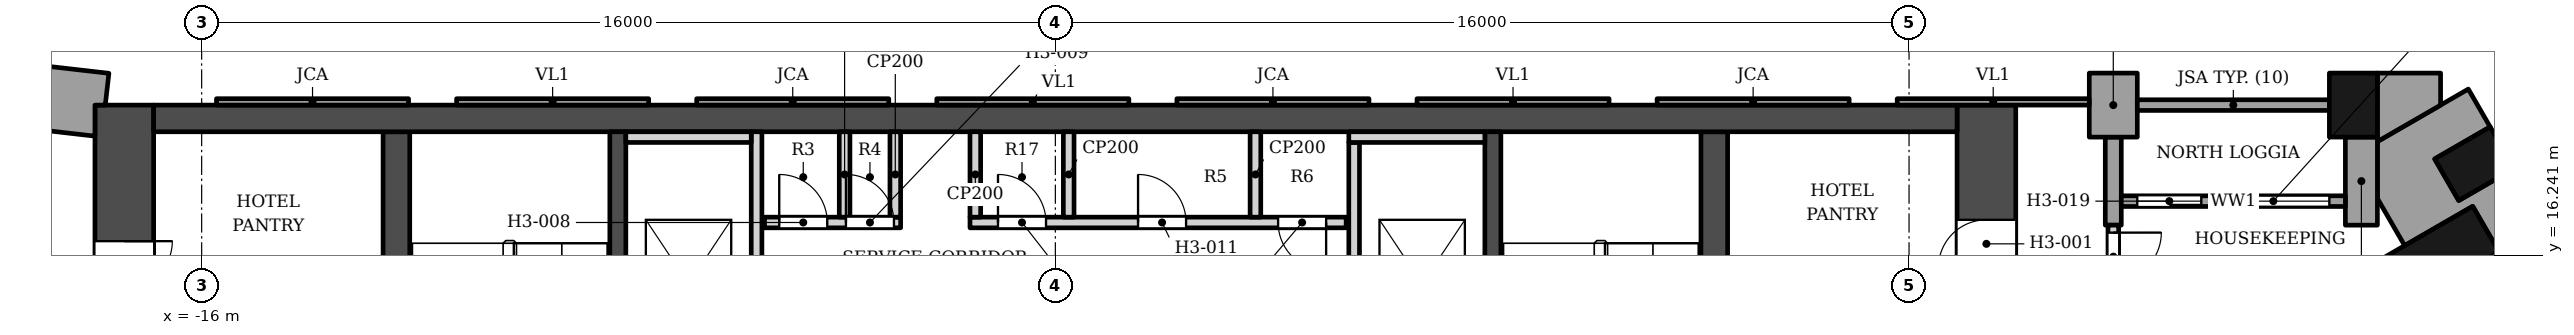
"""IFC4 building model, lengths in metres.
Left out: names, types, materials, properties, quantities, classifications, styles, units other than length and angle.
Written with IfcOpenShell. Run it as: python <this file> out.ifc"""

import sys

from ifc_helpers import new_model, si_unit, direction, frame, frame_2d, origin, origin_2d, place, context, subcontext, project, spatial, polyline, rectangle, outline, extrude, element, fill, save


model = new_model("IFC4")
c1 = context("Model", 3, precision=1e-05, world=origin(), true_north=direction((0.0, 1.0)))
c2 = subcontext(c1, "Body", "Model", "MODEL_VIEW")
j1 = project(units=[si_unit("LENGTHUNIT", "METRE"), si_unit("PLANEANGLEUNIT", "RADIAN")], contexts=[c1])
p1 = place(None, origin())
s1 = spatial("IfcSite", under=j1, at=p1, CompositionType="ELEMENT")
p2 = place(p1, origin())
s2 = spatial("IfcBuilding", under=s1, at=p2, CompositionType="ELEMENT")
p3 = place(p2, frame((0.0, 0.0, 66.4)))
s3 = spatial("IfcBuildingStorey", under=s2, at=p3, CompositionType="ELEMENT", Elevation=66.4)
p4 = place(p3, frame((-16.9, 18.802, 0.0), z_axis=(0.0, 0.0, 1.0), x_axis=(1.0, 0.0, 0.0)))
e1 = element("IfcWall", 1, at=p4, inside=s3, PredefinedType="SHEAR", context=c2, shape_type="SweptSolid", body=[
    extrude(rectangle(XDim=33.8, YDim=0.5, at=frame_2d((16.9, 0.0))), origin(), (0.0, 0.0, 1.0), 3.4),
])
p5 = place(p3, frame((-12.35, 5.253, 0.0), z_axis=(0.0, 0.0, 1.0), x_axis=(0.0, 1.0, 0.0)))
e2 = element("IfcWall", 2, at=p5, inside=s3, PredefinedType="SHEAR", context=c2, shape_type="SweptSolid", body=[
    extrude(rectangle(XDim=13.3, YDim=0.5, at=frame_2d((6.65, 0.0))), origin(), (0.0, 0.0, 1.0), 3.4),
])
p6 = place(p3, frame((-8.2, 5.253, 0.0), z_axis=(0.0, 0.0, 1.0), x_axis=(0.0, 1.0, 0.0)))
e3 = element("IfcWall", 3, at=p6, inside=s3, PredefinedType="SHEAR", context=c2, shape_type="SweptSolid", body=[
    extrude(rectangle(XDim=13.3, YDim=0.3, at=frame_2d((6.65, 0.0))), origin(), (0.0, 0.0, 1.0), 3.4),
])
p7 = place(p6, frame((7.1, 0.0, 0.0)))
e4 = element("IfcOpeningElement", 4, at=p7, cuts=e3, PredefinedType="OPENING", context=c2, shape_type="SweptSolid", body=[
    extrude(rectangle(XDim=1.4, YDim=2.1, at=frame_2d((0.7, 1.05))), frame((0.0, 0.16, 0.0), z_axis=(0.0, -1.0, 0.0), x_axis=(1.0, 0.0, 0.0)), (0.0, 0.0, 1.0), 0.32),
])
p8 = place(p6, frame((5.05, 0.0, 0.0)))
e5 = element("IfcOpeningElement", 5, at=p8, cuts=e3, PredefinedType="OPENING", context=c2, shape_type="SweptSolid", body=[
    extrude(rectangle(XDim=1.4, YDim=2.1, at=frame_2d((0.7, 1.05))), frame((0.0, 0.16, 0.0), z_axis=(0.0, -1.0, 0.0), x_axis=(1.0, 0.0, 0.0)), (0.0, 0.0, 1.0), 0.32),
])
p9 = place(p3, frame((12.35, 5.253, 0.0), z_axis=(0.0, 0.0, 1.0), x_axis=(0.0, 1.0, 0.0)))
e6 = element("IfcWall", 6, at=p9, inside=s3, PredefinedType="SHEAR", context=c2, shape_type="SweptSolid", body=[
    extrude(rectangle(XDim=13.3, YDim=0.5, at=frame_2d((6.65, 0.0))), origin(), (0.0, 0.0, 1.0), 3.4),
])
p10 = place(p3, frame((8.2, 5.253, 0.0), z_axis=(0.0, 0.0, 1.0), x_axis=(0.0, 1.0, 0.0)))
e7 = element("IfcWall", 7, at=p10, inside=s3, PredefinedType="SHEAR", context=c2, shape_type="SweptSolid", body=[
    extrude(rectangle(XDim=13.3, YDim=0.3, at=frame_2d((6.65, 0.0))), origin(), (0.0, 0.0, 1.0), 3.4),
])
p11 = place(p10, frame((7.1, 0.0, 0.0)))
e8 = element("IfcOpeningElement", 8, at=p11, cuts=e7, PredefinedType="OPENING", context=c2, shape_type="SweptSolid", body=[
    extrude(rectangle(XDim=1.4, YDim=2.1, at=frame_2d((0.7, 1.05))), frame((0.0, 0.16, 0.0), z_axis=(0.0, -1.0, 0.0), x_axis=(1.0, 0.0, 0.0)), (0.0, 0.0, 1.0), 0.32),
])
p12 = place(p10, frame((5.05, 0.0, 0.0)))
e9 = element("IfcOpeningElement", 9, at=p12, cuts=e7, PredefinedType="OPENING", context=c2, shape_type="SweptSolid", body=[
    extrude(rectangle(XDim=1.4, YDim=2.1, at=frame_2d((0.7, 1.05))), frame((0.0, 0.16, 0.0), z_axis=(0.0, -1.0, 0.0), x_axis=(1.0, 0.0, 0.0)), (0.0, 0.0, 1.0), 0.32),
])
p13 = place(p3, frame((-17.45, 5.853, 0.0), z_axis=(0.0, 0.0, 1.0), x_axis=(0.0, 1.0, 0.0)))
e10 = element("IfcWall", 10, at=p13, inside=s3, PredefinedType="SHEAR", context=c2, shape_type="SweptSolid", body=[
    extrude(rectangle(XDim=13.2, YDim=1.1, at=frame_2d((6.6, 0.0))), origin(), (0.0, 0.0, 1.0), 3.4),
])
p14 = place(p13, frame((4.1, 0.0, 0.0)))
e11 = element("IfcOpeningElement", 11, at=p14, cuts=e10, PredefinedType="OPENING", context=c2, shape_type="SweptSolid", body=[
    extrude(rectangle(XDim=1.6, YDim=2.1, at=frame_2d((0.8, 1.05))), frame((0.0, 0.56, 0.0), z_axis=(0.0, -1.0, 0.0), x_axis=(1.0, 0.0, 0.0)), (0.0, 0.0, 1.0), 1.12),
])
p15 = place(p13, frame((9.75, 0.0, 0.0)))
e12 = element("IfcOpeningElement", 12, at=p15, cuts=e10, PredefinedType="OPENING", context=c2, shape_type="SweptSolid", body=[
    extrude(rectangle(XDim=0.9, YDim=2.1, at=frame_2d((0.45, 1.05))), frame((0.0, 0.56, 0.0), z_axis=(0.0, -1.0, 0.0), x_axis=(1.0, 0.0, 0.0)), (0.0, 0.0, 1.0), 1.12),
])
p16 = place(p3, frame((17.45, 5.853, 0.0), z_axis=(0.0, 0.0, 1.0), x_axis=(0.0, 1.0, 0.0)))
e13 = element("IfcWall", 13, at=p16, inside=s3, PredefinedType="SHEAR", context=c2, shape_type="SweptSolid", body=[
    extrude(rectangle(XDim=13.2, YDim=1.1, at=frame_2d((6.6, 0.0))), origin(), (0.0, 0.0, 1.0), 3.4),
])
p17 = place(p16, frame((4.1, 0.0, 0.0)))
e14 = element("IfcOpeningElement", 14, at=p17, cuts=e13, PredefinedType="OPENING", context=c2, shape_type="SweptSolid", body=[
    extrude(rectangle(XDim=1.6, YDim=2.1, at=frame_2d((0.8, 1.05))), frame((0.0, 0.56, 0.0), z_axis=(0.0, -1.0, 0.0), x_axis=(1.0, 0.0, 0.0)), (0.0, 0.0, 1.0), 1.12),
])
p18 = place(p16, frame((10.15, 0.0, 0.0)))
e15 = element("IfcOpeningElement", 15, at=p18, cuts=e13, PredefinedType="OPENING", context=c2, shape_type="SweptSolid", body=[
    extrude(rectangle(XDim=0.9, YDim=2.1, at=frame_2d((0.45, 1.05))), frame((0.0, 0.56, 0.0), z_axis=(0.0, -1.0, 0.0), x_axis=(1.0, 0.0, 0.0)), (0.0, 0.0, 1.0), 1.12),
])
p19 = place(p3, frame((25.988, 15.004, 0.0), z_axis=(0.0, 0.0, 1.0), x_axis=(-0.866025412511, -0.499999984885, 0.0)))
e16 = element("IfcColumn", 16, at=p19, inside=s3, PredefinedType="COLUMN", context=c2, shape_type="SweptSolid", body=[
    extrude(rectangle(XDim=3.15, YDim=3.15, at=origin_2d()), origin(), (0.0, 0.0, 1.0), 3.4),
])
for number, where, z_axis, x_axis in (
    (17, (26.597, 17.954, 0.0), (0.0, 0.0, 1.0), (-0.5, 0.866, 0.0)),
    (18, (24.328, 19.053, 0.0), (0.0, 0.0, 1.0), (-1.0, 0.0, 0.0)),
):
    element("IfcColumn", number, at=place(p3, frame(where, z_axis=z_axis, x_axis=x_axis)), inside=s3, PredefinedType="COLUMN", context=c2, shape_type="SweptSolid", body=[
        extrude(rectangle(XDim=0.9, YDim=1.2, at=origin_2d()), origin(), (0.0, 0.0, 1.0), 3.4),
    ])
p20 = place(p3, origin())
e19 = element("IfcWall", 19, at=p20, inside=s3, PredefinedType="SOLIDWALL", context=c2, shape_type="SweptSolid", body=[
    extrude(outline(polyline([(24.778, 16.802), (24.778, 18.453), (24.178, 18.453), (24.178, 16.802), (24.778, 16.802)])), origin(), (0.0, 0.0, 1.0), 2.65),
])
p21 = place(p3, origin())
e20 = element("IfcWall", 20, at=p21, inside=s3, PredefinedType="SOLIDWALL", context=c2, shape_type="SweptSolid", body=[
    extrude(outline(polyline([(20.278, 19.653), (19.378, 19.653), (19.378, 18.453), (20.278, 18.453), (20.278, 19.653)])), origin(), (0.0, 0.0, 1.0), 2.65),
])
p22 = place(p3, origin())
e21 = element("IfcWall", 21, at=p22, inside=s3, PredefinedType="SOLIDWALL", context=c2, shape_type="SweptSolid", body=[
    extrude(outline(polyline([(19.678, 18.453), (19.678, 16.802), (19.978, 16.802), (19.978, 18.453), (19.678, 18.453)])), origin(), (0.0, 0.0, 1.0), 2.65),
])
p23 = place(p3, frame((23.878, 19.052, 0.0), z_axis=(0.0, 0.0, 1.0), x_axis=(-1.0, 0.0, 0.0)))
e22 = element("IfcWall", 22, at=p23, inside=s3, PredefinedType="SOLIDWALL", context=c2, shape_type="SweptSolid", body=[
    extrude(rectangle(XDim=3.6, YDim=0.2, at=frame_2d((1.8, 0.0))), origin(), (0.0, 0.0, 1.0), 2.65),
])
p24 = place(p3, frame((24.178, 17.252, 0.0), z_axis=(0.0, 0.0, 1.0), x_axis=(-1.0, 0.0, 0.0)))
e23 = element("IfcWall", 23, at=p24, inside=s3, PredefinedType="ELEMENTEDWALL", context=c2, shape_type="SweptSolid", body=[
    extrude(rectangle(XDim=4.2, YDim=0.2, at=frame_2d((2.1, 0.0))), origin(), (0.0, 0.0, 1.0), 2.65),
])
p25 = place(p24, frame((0.3, 0.0, 0.6)))
e24 = element("IfcOpeningElement", 24, at=p25, cuts=e23, PredefinedType="OPENING", context=c2, shape_type="SweptSolid", body=[
    extrude(rectangle(XDim=2.1, YDim=1.8, at=frame_2d((1.05, 0.9))), frame((0.0, 0.11, 0.0), z_axis=(0.0, -1.0, 0.0), x_axis=(1.0, 0.0, 0.0)), (0.0, 0.0, 1.0), 0.22),
])
p26 = place(p24, frame((2.7, 0.0, 0.0)))
e25 = element("IfcOpeningElement", 25, at=p26, cuts=e23, PredefinedType="OPENING", context=c2, shape_type="SweptSolid", body=[
    extrude(rectangle(XDim=1.2, YDim=2.4, at=frame_2d((0.6, 1.2))), frame((0.0, 0.11, 0.0), z_axis=(0.0, -1.0, 0.0), x_axis=(1.0, 0.0, 0.0)), (0.0, 0.0, 1.0), 0.22),
])
p27 = place(p3, origin())
e26 = element("IfcWall", 26, at=p27, inside=s3, PredefinedType="ELEMENTEDWALL", context=c2, shape_type="SweptSolid", body=[
    extrude(outline(polyline([(15.778, 19.173), (15.778, 19.052), (19.377, 19.052), (19.377, 19.173), (15.778, 19.173)])), origin(), (0.0, 0.0, 1.0), 2.65),
])
p28 = place(p3, origin())
e27 = element("IfcWall", 27, at=p28, inside=s3, PredefinedType="SOLIDWALL", context=c2, shape_type="SweptSolid", body=[
    extrude(outline(polyline([(11.278, 19.173), (11.278, 19.052), (14.878, 19.052), (14.878, 19.173), (11.278, 19.173)])), origin(), (0.0, 0.0, 1.0), 2.65),
])
p29 = place(p3, origin())
e28 = element("IfcWall", 28, at=p29, inside=s3, PredefinedType="ELEMENTEDWALL", context=c2, shape_type="SweptSolid", body=[
    extrude(outline(polyline([(6.778, 19.173), (6.778, 19.052), (10.378, 19.052), (10.378, 19.173), (6.778, 19.173)])), origin(), (0.0, 0.0, 1.0), 2.65),
])
p30 = place(p3, origin())
e29 = element("IfcWall", 29, at=p30, inside=s3, PredefinedType="SOLIDWALL", context=c2, shape_type="SweptSolid", body=[
    extrude(outline(polyline([(2.278, 19.173), (2.278, 19.052), (5.878, 19.052), (5.878, 19.173), (2.278, 19.173)])), origin(), (0.0, 0.0, 1.0), 2.65),
])
p31 = place(p3, origin())
e30 = element("IfcWall", 30, at=p31, inside=s3, PredefinedType="ELEMENTEDWALL", context=c2, shape_type="SweptSolid", body=[
    extrude(outline(polyline([(-2.222, 19.173), (-2.222, 19.052), (1.378, 19.052), (1.378, 19.173), (-2.222, 19.173)])), origin(), (0.0, 0.0, 1.0), 2.65),
])
p32 = place(p3, origin())
e31 = element("IfcWall", 31, at=p32, inside=s3, PredefinedType="SOLIDWALL", context=c2, shape_type="SweptSolid", body=[
    extrude(outline(polyline([(-6.722, 19.173), (-6.722, 19.052), (-3.122, 19.052), (-3.122, 19.173), (-6.722, 19.173)])), origin(), (0.0, 0.0, 1.0), 2.65),
])
p33 = place(p3, origin())
e32 = element("IfcWall", 32, at=p33, inside=s3, PredefinedType="ELEMENTEDWALL", context=c2, shape_type="SweptSolid", body=[
    extrude(outline(polyline([(-11.222, 19.173), (-11.222, 19.052), (-7.622, 19.052), (-7.622, 19.173), (-11.222, 19.173)])), origin(), (0.0, 0.0, 1.0), 2.65),
])
p34 = place(p3, origin())
e33 = element("IfcWall", 33, at=p34, inside=s3, PredefinedType="SOLIDWALL", context=c2, shape_type="SweptSolid", body=[
    extrude(outline(polyline([(-15.722, 19.173), (-15.722, 19.052), (-12.122, 19.052), (-12.122, 19.173), (-15.722, 19.173)])), origin(), (0.0, 0.0, 1.0), 2.65),
])
p35 = place(p3, origin())
e34 = element("IfcWall", 34, at=p35, inside=s3, PredefinedType="SOLIDWALL", context=c2, shape_type="SweptSolid", body=[
    extrude(outline(polyline([(25.852, 18.044), (26.891, 18.644), (26.482, 19.353), (24.778, 18.369), (24.778, 17.304), (25.289, 16.419), (26.564, 17.156), (28.139, 14.427), (26.864, 13.691), (27.287, 12.958), (27.836, 13.908), (28.443, 13.558), (28.102, 14.147), (29.141, 14.747), (27.341, 17.864), (26.302, 17.264), (25.852, 18.044)])), origin(), (0.0, 0.0, 1.0), 2.63),
])
p36 = place(p3, origin())
e35 = element("IfcWall", 35, at=p36, inside=s3, PredefinedType="SOLIDWALL", context=c2, shape_type="SweptSolid", body=[
    extrude(outline(polyline([(24.778, 18.453), (24.778, 18.369), (25.962, 19.052), (25.962, 19.653), (24.778, 19.653), (24.778, 18.453), (24.778, 18.453)])), origin(), (0.0, 0.0, 1.0), 2.63),
])
p37 = place(p3, origin())
e36 = element("IfcWall", 36, at=p37, inside=s3, PredefinedType="SOLIDWALL", context=c2, shape_type="SweptSolid", body=[
    extrude(outline(polyline([(-20.658, 19.983), (-20.795, 18.791), (-18.0, 18.471), (-18.0, 19.052), (-17.807, 19.052), (-17.739, 19.649), (-20.658, 19.983)])), origin(), (0.0, 0.0, 1.0), 2.65),
])
p38 = place(p3, frame((-5.6, 14.253, 0.0), z_axis=(0.0, 0.0, 1.0), x_axis=(0.0, 1.0, 0.0)))
e37 = element("IfcWall", 37, at=p38, inside=s3, PredefinedType="SOLIDWALL", context=c2, shape_type="SweptSolid", body=[
    extrude(rectangle(XDim=4.3, YDim=0.2, at=frame_2d((2.15, 0.0))), origin(), (0.0, 0.0, 1.0), 3.23),
])
p39 = place(p3, frame((5.6, 15.453, 0.0), z_axis=(0.0, 0.0, 1.0), x_axis=(0.0, 1.0, 0.0)))
e38 = element("IfcWall", 38, at=p39, inside=s3, PredefinedType="SOLIDWALL", context=c2, shape_type="SweptSolid", body=[
    extrude(rectangle(XDim=2.9, YDim=0.2, at=frame_2d((1.45, 0.0))), origin(), (0.0, 0.0, 1.0), 3.23),
])
p40 = place(p3, frame((-5.45, 16.853, 0.0), z_axis=(0.0, 0.0, 1.0), x_axis=(1.0, 0.0, 0.0)))
e39 = element("IfcWall", 39, at=p40, inside=s3, PredefinedType="SOLIDWALL", context=c2, shape_type="SweptSolid", body=[
    extrude(rectangle(XDim=2.55, YDim=0.2, at=frame_2d((1.275, 0.0))), origin(), (0.0, 0.0, 1.0), 3.23),
])
p41 = place(p40, frame((0.275, 0.0, 0.0)))
e40 = element("IfcOpeningElement", 40, at=p41, cuts=e39, PredefinedType="OPENING", context=c2, shape_type="SweptSolid", body=[
    extrude(rectangle(XDim=0.9, YDim=2.1, at=frame_2d((0.45, 1.05))), frame((0.0, 0.11, 0.0), z_axis=(0.0, -1.0, 0.0), x_axis=(1.0, 0.0, 0.0)), (0.0, 0.0, 1.0), 0.22),
])
p42 = place(p40, frame((1.525, 0.0, 0.0)))
e41 = element("IfcOpeningElement", 41, at=p42, cuts=e39, PredefinedType="OPENING", context=c2, shape_type="SweptSolid", body=[
    extrude(rectangle(XDim=0.9, YDim=2.1, at=frame_2d((0.45, 1.05))), frame((0.0, 0.11, 0.0), z_axis=(0.0, -1.0, 0.0), x_axis=(1.0, 0.0, 0.0)), (0.0, 0.0, 1.0), 0.22),
])
p43 = place(p3, frame((-1.6, 16.853, 0.0), z_axis=(0.0, 0.0, 1.0), x_axis=(1.0, 0.0, 0.0)))
e42 = element("IfcWall", 42, at=p43, inside=s3, PredefinedType="SOLIDWALL", context=c2, shape_type="SweptSolid", body=[
    extrude(rectangle(XDim=7.05, YDim=0.2, at=frame_2d((3.525, 0.0))), origin(), (0.0, 0.0, 1.0), 3.23),
])
p44 = place(p43, frame((0.525, 0.0, 0.0)))
e43 = element("IfcOpeningElement", 43, at=p44, cuts=e42, PredefinedType="OPENING", context=c2, shape_type="SweptSolid", body=[
    extrude(rectangle(XDim=0.9, YDim=2.1, at=frame_2d((0.45, 1.05))), frame((0.0, 0.11, 0.0), z_axis=(0.0, -1.0, 0.0), x_axis=(1.0, 0.0, 0.0)), (0.0, 0.0, 1.0), 0.22),
])
p45 = place(p43, frame((3.15, 0.0, 0.0)))
e44 = element("IfcOpeningElement", 44, at=p45, cuts=e42, PredefinedType="OPENING", context=c2, shape_type="SweptSolid", body=[
    extrude(rectangle(XDim=0.9, YDim=2.1, at=frame_2d((0.45, 1.05))), frame((0.0, 0.11, 0.0), z_axis=(0.0, -1.0, 0.0), x_axis=(1.0, 0.0, 0.0)), (0.0, 0.0, 1.0), 0.22),
])
p46 = place(p43, frame((5.775, 0.0, 0.0)))
e45 = element("IfcOpeningElement", 45, at=p46, cuts=e42, PredefinedType="OPENING", context=c2, shape_type="SweptSolid", body=[
    extrude(rectangle(XDim=0.9, YDim=2.1, at=frame_2d((0.45, 1.05))), frame((0.0, 0.11, 0.0), z_axis=(0.0, -1.0, 0.0), x_axis=(1.0, 0.0, 0.0)), (0.0, 0.0, 1.0), 0.22),
])
for number, where, z_axis, x_axis in (
    (46, (-3.95, 16.953, 0.0), (0.0, 0.0, 1.0), (0.0, 1.0, 0.0)),
    (47, (-3.0, 16.953, 0.0), (0.0, 0.0, 1.0), (0.0, 1.0, 0.0)),
    (48, (-1.5, 16.953, 0.0), (0.0, 0.0, 1.0), (0.0, 1.0, 0.0)),
    (49, (0.25, 16.953, 0.0), (0.0, 0.0, 1.0), (0.0, 1.0, 0.0)),
    (50, (3.75, 16.953, 0.0), (0.0, 0.0, 1.0), (0.0, 1.0, 0.0)),
):
    element("IfcWall", number, at=place(p3, frame(where, z_axis=z_axis, x_axis=x_axis)), inside=s3, PredefinedType="PARTITIONING", context=c2, shape_type="SweptSolid", body=[
        extrude(rectangle(XDim=1.6, YDim=0.2, at=frame_2d((0.8, 0.0))), origin(), (0.0, 0.0, 1.0), 3.23),
    ])
p47 = place(p3, frame((-8.05, 18.453, 0.0), z_axis=(0.0, 0.0, 1.0), x_axis=(1.0, 0.0, 0.0)))
e51 = element("IfcWall", 51, at=p47, inside=s3, PredefinedType="SOLIDWALL", context=c2, shape_type="SweptSolid", body=[
    extrude(rectangle(XDim=2.35, YDim=0.2, at=frame_2d((1.175, 0.0))), origin(), (0.0, 0.0, 1.0), 3.23),
])
p48 = place(p3, frame((5.5, 18.453, 0.0), z_axis=(0.0, 0.0, 1.0), x_axis=(1.0, 0.0, 0.0)))
e52 = element("IfcWall", 52, at=p48, inside=s3, PredefinedType="SOLIDWALL", context=c2, shape_type="SweptSolid", body=[
    extrude(rectangle(XDim=2.55, YDim=0.2, at=frame_2d((1.275, 0.0))), origin(), (0.0, 0.0, 1.0), 3.23),
])
p49 = place(p3, frame((19.828, 16.802, 0.0), z_axis=(0.0, 0.0, 1.0), x_axis=(0.000988793188, -0.999999511144, 0.0)))
e53 = element("IfcWall", 53, at=p49, inside=s3, PredefinedType="PARTITIONING", context=c2, shape_type="SweptSolid", body=[
    extrude(rectangle(XDim=1.481, YDim=0.2, at=frame_2d((0.741, 0.0))), origin(), (0.0, 0.0, 1.0), 3.23),
])
p50 = place(p49, frame((0.14, 0.0, 0.0)))
e54 = element("IfcOpeningElement", 54, at=p50, cuts=e53, PredefinedType="OPENING", context=c2, shape_type="SweptSolid", body=[
    extrude(rectangle(XDim=0.9, YDim=2.1, at=frame_2d((0.45, 1.05))), frame((0.0, 0.11, 0.0), z_axis=(0.0, -1.0, 0.0), x_axis=(1.0, 0.0, 0.0)), (0.0, 0.0, 1.0), 0.22),
])
p51 = place(p25, origin())
e55 = element("IfcWindow", 55, at=p51, inside=s3, PartitioningType="SINGLE_PANEL", PredefinedType="WINDOW", context=c2, shape_type="SweptSolid", body=[
    extrude(rectangle(XDim=2.1, YDim=1.8, at=frame_2d((1.05, 0.9))), frame((0.0, 0.03, 0.0), z_axis=(0.0, -1.0, 0.0), x_axis=(1.0, 0.0, 0.0)), (0.0, 0.0, 1.0), 0.06),
])
fill(e24, e55)
p52 = place(p26, origin())
e56 = element("IfcDoor", 56, at=p52, inside=s3, OperationType="SINGLE_SWING_LEFT", PredefinedType="DOOR", context=c2, shape_type="SweptSolid", body=[
    extrude(rectangle(XDim=1.2, YDim=2.4, at=frame_2d((0.6, 1.2))), frame((0.0, 0.025, 0.0), z_axis=(0.0, -1.0, 0.0), x_axis=(1.0, 0.0, 0.0)), (0.0, 0.0, 1.0), 0.05),
])
fill(e25, e56)
p53 = place(p41, origin())
e57 = element("IfcDoor", 57, at=p53, inside=s3, OperationType="SINGLE_SWING_LEFT", PredefinedType="DOOR", context=c2, shape_type="SweptSolid", body=[
    extrude(rectangle(XDim=0.9, YDim=2.1, at=frame_2d((0.45, 1.05))), frame((0.0, 0.025, 0.0), z_axis=(0.0, -1.0, 0.0), x_axis=(1.0, 0.0, 0.0)), (0.0, 0.0, 1.0), 0.05),
])
fill(e40, e57)
p54 = place(p42, origin())
e58 = element("IfcDoor", 58, at=p54, inside=s3, OperationType="SINGLE_SWING_LEFT", PredefinedType="DOOR", context=c2, shape_type="SweptSolid", body=[
    extrude(rectangle(XDim=0.9, YDim=2.1, at=frame_2d((0.45, 1.05))), frame((0.0, 0.025, 0.0), z_axis=(0.0, -1.0, 0.0), x_axis=(1.0, 0.0, 0.0)), (0.0, 0.0, 1.0), 0.05),
])
fill(e41, e58)
p55 = place(p44, origin())
e59 = element("IfcDoor", 59, at=p55, inside=s3, OperationType="SINGLE_SWING_LEFT", PredefinedType="DOOR", context=c2, shape_type="SweptSolid", body=[
    extrude(rectangle(XDim=0.9, YDim=2.1, at=frame_2d((0.45, 1.05))), frame((0.0, 0.025, 0.0), z_axis=(0.0, -1.0, 0.0), x_axis=(1.0, 0.0, 0.0)), (0.0, 0.0, 1.0), 0.05),
])
fill(e43, e59)
p56 = place(p45, origin())
e60 = element("IfcDoor", 60, at=p56, inside=s3, OperationType="SINGLE_SWING_LEFT", PredefinedType="DOOR", context=c2, shape_type="SweptSolid", body=[
    extrude(rectangle(XDim=0.9, YDim=2.1, at=frame_2d((0.45, 1.05))), frame((0.0, 0.025, 0.0), z_axis=(0.0, -1.0, 0.0), x_axis=(1.0, 0.0, 0.0)), (0.0, 0.0, 1.0), 0.05),
])
fill(e44, e60)
p57 = place(p46, origin())
e61 = element("IfcDoor", 61, at=p57, inside=s3, OperationType="SINGLE_SWING_RIGHT", PredefinedType="DOOR", context=c2, shape_type="SweptSolid", body=[
    extrude(rectangle(XDim=0.9, YDim=2.1, at=frame_2d((0.45, 1.05))), frame((0.0, 0.025, 0.0), z_axis=(0.0, -1.0, 0.0), x_axis=(1.0, 0.0, 0.0)), (0.0, 0.0, 1.0), 0.05),
])
fill(e45, e61)
p58 = place(p15, origin())
e62 = element("IfcDoor", 62, at=p58, inside=s3, OperationType="SINGLE_SWING_RIGHT", PredefinedType="DOOR", context=c2, shape_type="SweptSolid", body=[
    extrude(rectangle(XDim=0.9, YDim=2.1, at=frame_2d((0.45, 1.05))), frame((0.0, -0.225, 0.0), z_axis=(0.0, -1.0, 0.0), x_axis=(1.0, 0.0, 0.0)), (0.0, 0.0, 1.0), 0.05),
])
fill(e12, e62)
p59 = place(p18, origin())
e63 = element("IfcDoor", 63, at=p59, inside=s3, OperationType="SINGLE_SWING_LEFT", PredefinedType="DOOR", context=c2, shape_type="SweptSolid", body=[
    extrude(rectangle(XDim=0.9, YDim=2.1, at=frame_2d((0.45, 1.05))), frame((0.0, 0.275, 0.0), z_axis=(0.0, -1.0, 0.0), x_axis=(1.0, 0.0, 0.0)), (0.0, 0.0, 1.0), 0.05),
])
fill(e15, e63)
p60 = place(p50, origin())
e64 = element("IfcDoor", 64, at=p60, inside=s3, OperationType="SINGLE_SWING_LEFT", PredefinedType="DOOR", context=c2, shape_type="SweptSolid", body=[
    extrude(rectangle(XDim=0.9, YDim=2.1, at=frame_2d((0.45, 1.05))), frame((0.0, 0.025, 0.0), z_axis=(0.0, -1.0, 0.0), x_axis=(1.0, 0.0, 0.0)), (0.0, 0.0, 1.0), 0.05),
])
fill(e54, e64)
save(model, sys.argv[1])
